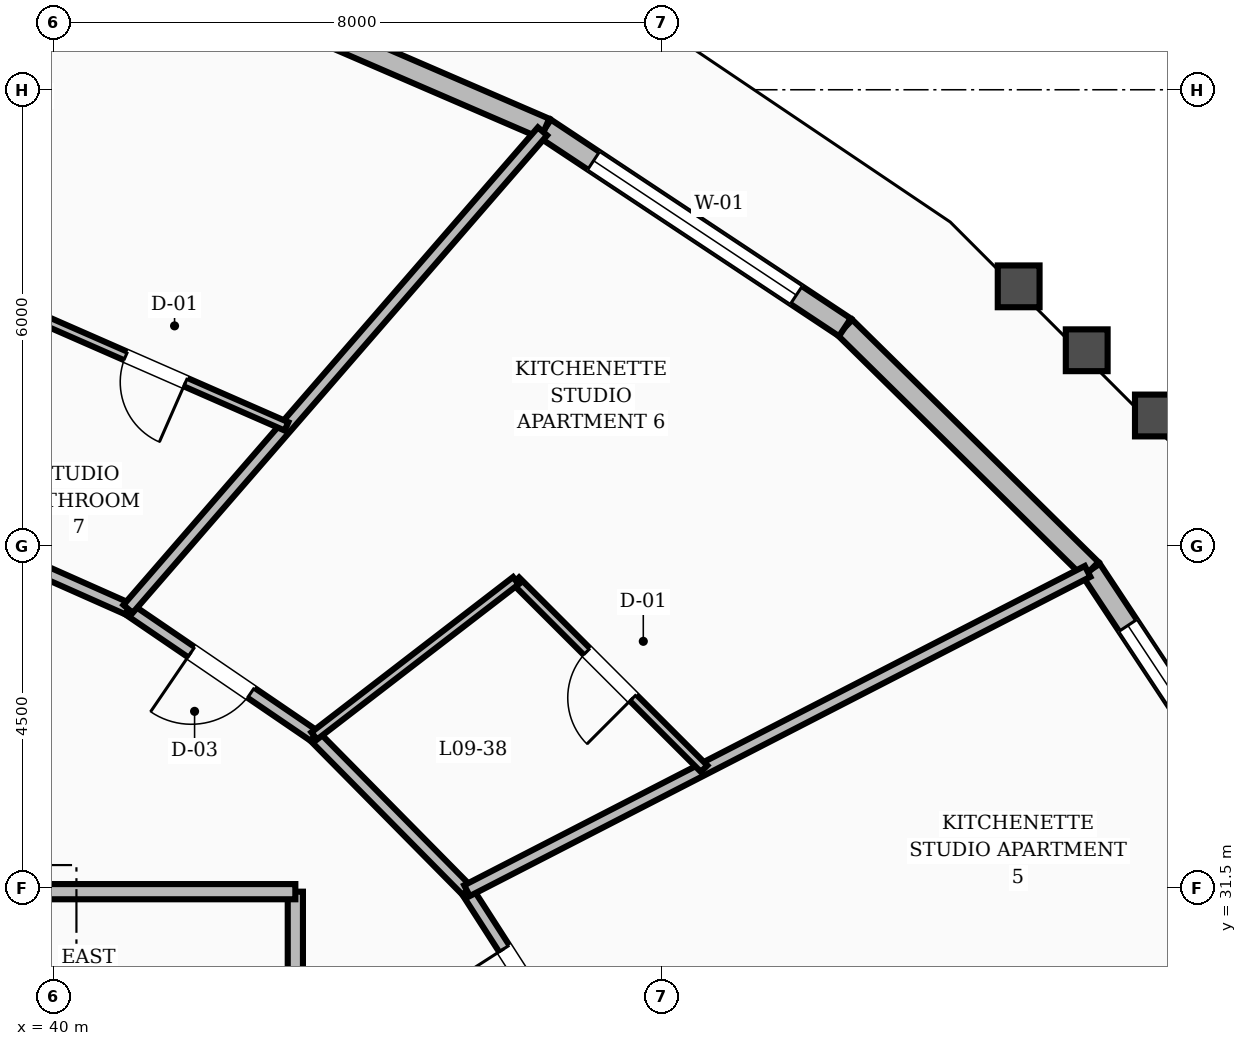
"""IFC4 building model, lengths in metres.
Left out: names, types, materials, properties, quantities, classifications, styles, units other than length and angle.
Written with IfcOpenShell. Run it as: python <this file> out.ifc"""

import sys

from ifc_helpers import new_model, si_unit, direction, frame, frame_2d, origin, place, context, subcontext, project, spatial, rectangle, extrude, element, fill, save


model = new_model("IFC4")
c1 = context("Model", 3, precision=1e-05, world=origin(), true_north=direction((0.0, 1.0)))
c2 = subcontext(c1, "Body", "Model", "MODEL_VIEW")
j1 = project(units=[si_unit("LENGTHUNIT", "METRE"), si_unit("PLANEANGLEUNIT", "RADIAN")], contexts=[c1])
p1 = place(None, origin())
s1 = spatial("IfcSite", under=j1, at=p1, CompositionType="ELEMENT")
p2 = place(p1, origin())
s2 = spatial("IfcBuilding", under=s1, at=p2, CompositionType="ELEMENT")
p3 = place(p2, frame((0.0, 0.0, 41.2)))
s3 = spatial("IfcBuildingStorey", under=s2, at=p3, CompositionType="ELEMENT", Elevation=41.2)
p4 = place(p3, frame((56.054, 32.05, 0.0), z_axis=(0.0, 0.0, 1.0), x_axis=(-0.551763829148, 0.834000405782, 0.0)))
e1 = element("IfcWall", 1, at=p4, inside=s3, PredefinedType="STANDARD", context=c2, shape_type="SweptSolid", body=[
    extrude(rectangle(XDim=4.361, YDim=0.28, at=frame_2d((2.18, 0.0))), origin(), (0.0, 0.0, 1.0), 2.65),
])
p5 = place(p4, frame((0.88, 0.0, 0.8)))
e2 = element("IfcOpeningElement", 2, at=p5, cuts=e1, PredefinedType="OPENING", context=c2, shape_type="SweptSolid", body=[
    extrude(rectangle(XDim=2.6, YDim=1.65, at=frame_2d((1.3, 0.825))), frame((0.0, 0.15, 0.0), z_axis=(0.0, -1.0, 0.0), x_axis=(1.0, 0.0, 0.0)), (0.0, 0.0, 1.0), 0.3),
])
p6 = place(p3, frame((53.648, 35.687, 0.0), z_axis=(0.0, 0.0, 1.0), x_axis=(-0.712592855148, 0.701577809506, 0.0)))
e3 = element("IfcWall", 3, at=p6, inside=s3, PredefinedType="STANDARD", context=c2, shape_type="SweptSolid", body=[
    extrude(rectangle(XDim=4.544, YDim=0.28, at=frame_2d((2.272, 0.0))), origin(), (0.0, 0.0, 1.0), 2.65),
])
p7 = place(p3, frame((50.41, 38.874, 0.0), z_axis=(0.0, 0.0, 1.0), x_axis=(-0.833436218894, 0.552615661229, 0.0)))
e4 = element("IfcWall", 4, at=p7, inside=s3, PredefinedType="STANDARD", context=c2, shape_type="SweptSolid", body=[
    extrude(rectangle(XDim=4.734, YDim=0.28, at=frame_2d((2.367, 0.0))), origin(), (0.0, 0.0, 1.0), 2.65),
])
p8 = place(p7, frame((0.767, 0.0, 0.8)))
e5 = element("IfcOpeningElement", 5, at=p8, cuts=e4, PredefinedType="OPENING", context=c2, shape_type="SweptSolid", body=[
    extrude(rectangle(XDim=3.2, YDim=1.65, at=frame_2d((1.6, 0.825))), frame((0.0, 0.15, 0.0), z_axis=(0.0, -1.0, 0.0), x_axis=(1.0, 0.0, 0.0)), (0.0, 0.0, 1.0), 0.3),
])
p9 = place(p3, frame((46.465, 41.49, 0.0), z_axis=(0.0, 0.0, 1.0), x_axis=(-0.918052056251, 0.396459861793, 0.0)))
e6 = element("IfcWall", 6, at=p9, inside=s3, PredefinedType="STANDARD", context=c2, shape_type="SweptSolid", body=[
    extrude(rectangle(XDim=4.903, YDim=0.28, at=frame_2d((2.452, 0.0))), origin(), (0.0, 0.0, 1.0), 2.65),
])
p10 = place(p3, frame((43.18, 28.32, 0.0), z_axis=(0.0, 0.0, 1.0), x_axis=(0.0, 1.0, 0.0)))
e7 = element("IfcWall", 7, at=p10, inside=s3, PredefinedType="SOLIDWALL", context=c2, shape_type="SweptSolid", body=[
    extrude(rectangle(XDim=3.13, YDim=0.2, at=frame_2d((1.565, 0.0))), origin(), (0.0, 0.0, 1.0), 2.61),
])
p11 = place(p10, frame((1.015, 0.0, 0.0)))
e8 = element("IfcOpeningElement", 8, at=p11, cuts=e7, PredefinedType="OPENING", context=c2, shape_type="SweptSolid", body=[
    extrude(rectangle(XDim=1.1, YDim=2.1, at=frame_2d((0.55, 1.05))), frame((0.0, 0.11, 0.0), z_axis=(0.0, -1.0, 0.0), x_axis=(1.0, 0.0, 0.0)), (0.0, 0.0, 1.0), 0.22),
])
p12 = place(p3, frame((39.2, 31.45, 0.0), z_axis=(0.0, 0.0, 1.0), x_axis=(1.0, 0.0, 0.0)))
e9 = element("IfcWall", 9, at=p12, inside=s3, PredefinedType="SOLIDWALL", context=c2, shape_type="SweptSolid", body=[
    extrude(rectangle(XDim=3.98, YDim=0.2, at=frame_2d((1.99, 0.0))), origin(), (0.0, 0.0, 1.0), 2.61),
])
p13 = place(p3, frame((46.932, 29.141, 0.0), z_axis=(0.0, 0.0, 1.0), x_axis=(-0.540891657444, 0.841092274907, 0.0)))
e10 = element("IfcWall", 10, at=p13, inside=s3, PredefinedType="SOLIDWALL", context=c2, shape_type="SweptSolid", body=[
    extrude(rectangle(XDim=2.761, YDim=0.16, at=frame_2d((1.38, 0.0))), origin(), (0.0, 0.0, 1.0), 2.61),
])
p14 = place(p13, frame((0.906, 0.0, 0.0)))
e11 = element("IfcOpeningElement", 11, at=p14, cuts=e10, PredefinedType="OPENING", context=c2, shape_type="SweptSolid", body=[
    extrude(rectangle(XDim=0.95, YDim=2.1, at=frame_2d((0.475, 1.05))), frame((0.0, 0.09, 0.0), z_axis=(0.0, -1.0, 0.0), x_axis=(1.0, 0.0, 0.0)), (0.0, 0.0, 1.0), 0.18),
])
p15 = place(p3, frame((45.438, 31.463, 0.0), z_axis=(0.0, 0.0, 1.0), x_axis=(-0.702569520063, 0.711615113301, 0.0)))
e12 = element("IfcWall", 12, at=p15, inside=s3, PredefinedType="SOLIDWALL", context=c2, shape_type="SweptSolid", body=[
    extrude(rectangle(XDim=2.861, YDim=0.16, at=frame_2d((1.43, 0.0))), origin(), (0.0, 0.0, 1.0), 2.61),
])
p16 = place(p3, frame((43.428, 33.499, 0.0), z_axis=(0.0, 0.0, 1.0), x_axis=(-0.826112340767, 0.563505457323, 0.0)))
e13 = element("IfcWall", 13, at=p16, inside=s3, PredefinedType="SOLIDWALL", context=c2, shape_type="SweptSolid", body=[
    extrude(rectangle(XDim=2.965, YDim=0.16, at=frame_2d((1.482, 0.0))), origin(), (0.0, 0.0, 1.0), 2.61),
])
p17 = place(p16, frame((1.007, 0.0, 0.0)))
e14 = element("IfcOpeningElement", 14, at=p17, cuts=e13, PredefinedType="OPENING", context=c2, shape_type="SweptSolid", body=[
    extrude(rectangle(XDim=0.95, YDim=2.1, at=frame_2d((0.475, 1.05))), frame((0.0, 0.09, 0.0), z_axis=(0.0, -1.0, 0.0), x_axis=(1.0, 0.0, 0.0)), (0.0, 0.0, 1.0), 0.18),
])
p18 = place(p3, frame((40.979, 35.17, 0.0), z_axis=(0.0, 0.0, 1.0), x_axis=(-0.913860932409, 0.406027334321, 0.0)))
e15 = element("IfcWall", 15, at=p18, inside=s3, PredefinedType="SOLIDWALL", context=c2, shape_type="SweptSolid", body=[
    extrude(rectangle(XDim=3.058, YDim=0.16, at=frame_2d((1.529, 0.0))), origin(), (0.0, 0.0, 1.0), 2.61),
])
p19 = place(p3, frame((45.438, 31.463, 0.0), z_axis=(0.0, 0.0, 1.0), x_axis=(0.889225689498, 0.45746876739, 0.0)))
e16 = element("IfcWall", 16, at=p19, inside=s3, PredefinedType="SOLIDWALL", context=c2, shape_type="SweptSolid", body=[
    extrude(rectangle(XDim=9.182, YDim=0.16, at=frame_2d((4.591, 0.0))), origin(), (0.0, 0.0, 1.0), 2.61),
])
p20 = place(p3, frame((48.558, 33.068, 0.0), z_axis=(0.0, 0.0, 1.0), x_axis=(-0.707560021101, 0.706653250569, 0.0)))
e17 = element("IfcWall", 17, at=p20, inside=s3, PredefinedType="PARTITIONING", context=c2, shape_type="SweptSolid", body=[
    extrude(rectangle(XDim=3.5, YDim=0.12, at=frame_2d((1.75, 0.0))), origin(), (0.0, 0.0, 1.0), 2.61),
])
p21 = place(p20, frame((1.32, 0.0, 0.0)))
e18 = element("IfcOpeningElement", 18, at=p21, cuts=e17, PredefinedType="OPENING", context=c2, shape_type="SweptSolid", body=[
    extrude(rectangle(XDim=0.86, YDim=2.1, at=frame_2d((0.43, 1.05))), frame((0.0, 0.07, 0.0), z_axis=(0.0, -1.0, 0.0), x_axis=(1.0, 0.0, 0.0)), (0.0, 0.0, 1.0), 0.14),
])
p22 = place(p3, frame((43.428, 33.499, 0.0), z_axis=(0.0, 0.0, 1.0), x_axis=(0.792385390658, 0.61002081331, 0.0)))
e19 = element("IfcWall", 19, at=p22, inside=s3, PredefinedType="PARTITIONING", context=c2, shape_type="SweptSolid", body=[
    extrude(rectangle(XDim=3.348, YDim=0.12, at=frame_2d((1.674, 0.0))), origin(), (0.0, 0.0, 1.0), 2.61),
])
p23 = place(p3, frame((40.979, 35.17, 0.0), z_axis=(0.0, 0.0, 1.0), x_axis=(0.655467806581, 0.755223115732, 0.0)))
e20 = element("IfcWall", 20, at=p23, inside=s3, PredefinedType="SOLIDWALL", context=c2, shape_type="SweptSolid", body=[
    extrude(rectangle(XDim=8.319, YDim=0.16, at=frame_2d((4.159, 0.0))), origin(), (0.0, 0.0, 1.0), 2.61),
])
p24 = place(p3, frame((43.064, 37.572, 0.0), z_axis=(0.0, 0.0, 1.0), x_axis=(-0.915967923971, 0.401251495022, 0.0)))
e21 = element("IfcWall", 21, at=p24, inside=s3, PredefinedType="PARTITIONING", context=c2, shape_type="SweptSolid", body=[
    extrude(rectangle(XDim=3.759, YDim=0.12, at=frame_2d((1.879, 0.0))), origin(), (0.0, 0.0, 1.0), 2.61),
])
p25 = place(p24, frame((1.449, 0.0, 0.0)))
e22 = element("IfcOpeningElement", 22, at=p25, cuts=e21, PredefinedType="OPENING", context=c2, shape_type="SweptSolid", body=[
    extrude(rectangle(XDim=0.86, YDim=2.1, at=frame_2d((0.43, 1.05))), frame((0.0, 0.07, 0.0), z_axis=(0.0, -1.0, 0.0), x_axis=(1.0, 0.0, 0.0)), (0.0, 0.0, 1.0), 0.14),
])
p26 = place(p5, origin())
e23 = element("IfcWindow", 23, at=p26, inside=s3, PartitioningType="SINGLE_PANEL", PredefinedType="WINDOW", context=c2, shape_type="SweptSolid", body=[
    extrude(rectangle(XDim=2.6, YDim=1.65, at=frame_2d((1.3, 0.825))), frame((0.0, 0.03, 0.0), z_axis=(0.0, -1.0, 0.0), x_axis=(1.0, 0.0, 0.0)), (0.0, 0.0, 1.0), 0.06),
])
fill(e2, e23)
p27 = place(p8, origin())
e24 = element("IfcWindow", 24, at=p27, inside=s3, PartitioningType="SINGLE_PANEL", PredefinedType="WINDOW", context=c2, shape_type="SweptSolid", body=[
    extrude(rectangle(XDim=3.2, YDim=1.65, at=frame_2d((1.6, 0.825))), frame((0.0, 0.03, 0.0), z_axis=(0.0, -1.0, 0.0), x_axis=(1.0, 0.0, 0.0)), (0.0, 0.0, 1.0), 0.06),
])
fill(e5, e24)
p28 = place(p14, origin())
e25 = element("IfcDoor", 25, at=p28, inside=s3, OperationType="SINGLE_SWING_RIGHT", PredefinedType="DOOR", context=c2, shape_type="SweptSolid", body=[
    extrude(rectangle(XDim=0.95, YDim=2.1, at=frame_2d((0.475, 1.05))), frame((0.0, 0.025, 0.0), z_axis=(0.0, -1.0, 0.0), x_axis=(1.0, 0.0, 0.0)), (0.0, 0.0, 1.0), 0.05),
])
fill(e11, e25)
p29 = place(p21, origin())
e26 = element("IfcDoor", 26, at=p29, inside=s3, OperationType="SINGLE_SWING_LEFT", PredefinedType="DOOR", context=c2, shape_type="SweptSolid", body=[
    extrude(rectangle(XDim=0.86, YDim=2.1, at=frame_2d((0.43, 1.05))), frame((0.0, 0.025, 0.0), z_axis=(0.0, -1.0, 0.0), x_axis=(1.0, 0.0, 0.0)), (0.0, 0.0, 1.0), 0.05),
])
fill(e18, e26)
p30 = place(p17, origin())
e27 = element("IfcDoor", 27, at=p30, inside=s3, OperationType="SINGLE_SWING_RIGHT", PredefinedType="DOOR", context=c2, shape_type="SweptSolid", body=[
    extrude(rectangle(XDim=0.95, YDim=2.1, at=frame_2d((0.475, 1.05))), frame((0.0, 0.025, 0.0), z_axis=(0.0, -1.0, 0.0), x_axis=(1.0, 0.0, 0.0)), (0.0, 0.0, 1.0), 0.05),
])
fill(e14, e27)
p31 = place(p25, origin())
e28 = element("IfcDoor", 28, at=p31, inside=s3, OperationType="SINGLE_SWING_LEFT", PredefinedType="DOOR", context=c2, shape_type="SweptSolid", body=[
    extrude(rectangle(XDim=0.86, YDim=2.1, at=frame_2d((0.43, 1.05))), frame((0.0, 0.025, 0.0), z_axis=(0.0, -1.0, 0.0), x_axis=(1.0, 0.0, 0.0)), (0.0, 0.0, 1.0), 0.05),
])
fill(e22, e28)
save(model, sys.argv[1])
